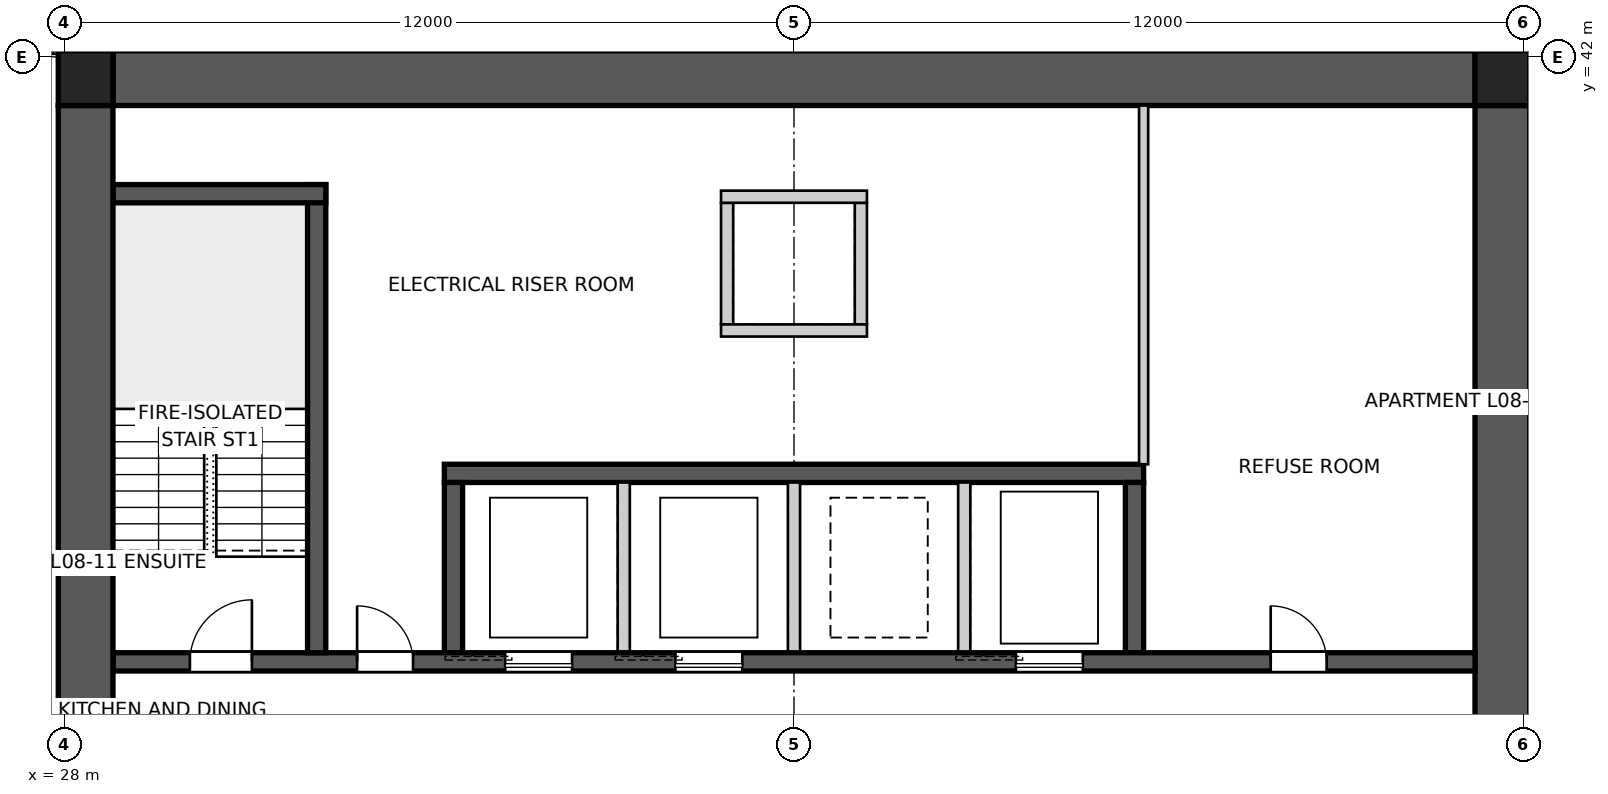
"""IFC4 building model, lengths in metres.
Left out: names, types, materials, properties, quantities, classifications, styles, units other than length and angle.
Written with IfcOpenShell. Run it as: python <this file> out.ifc"""

import sys

from ifc_helpers import new_model, si_unit, direction, frame, frame_2d, origin, origin_2d, place, context, subcontext, project, spatial, polyline, rectangle, outline, extrude, element, fill, save


model = new_model("IFC4")
c1 = context("Model", 3, precision=1e-05, world=origin(), true_north=direction((0.0, 1.0)))
c2 = subcontext(c1, "Body", "Model", "MODEL_VIEW")
j1 = project(units=[si_unit("LENGTHUNIT", "METRE"), si_unit("PLANEANGLEUNIT", "RADIAN")], contexts=[c1])
p1 = place(None, origin())
s1 = spatial("IfcSite", under=j1, at=p1, CompositionType="ELEMENT")
p2 = place(p1, origin())
s2 = spatial("IfcBuilding", under=s1, at=p2, CompositionType="ELEMENT")
p3 = place(p2, frame((0.0, 0.0, 32.0)))
s3 = spatial("IfcBuildingStorey", under=s2, at=p3, CompositionType="ELEMENT", Elevation=32.0)
p4 = place(p3, frame((28.8, 41.65, 0.0), z_axis=(0.0, 0.0, 1.0), x_axis=(1.0, 0.0, 0.0)))
e1 = element("IfcWall", 1, at=p4, inside=s3, PredefinedType="SHEAR", context=c2, shape_type="SweptSolid", body=[
    extrude(outline(polyline([(0.0, -0.45), (22.4, -0.45), (22.4, -0.025), (22.85, -0.025), (22.85, 0.025), (22.4, 0.025), (22.4, 0.45), (0.0, 0.45), (0.0, 0.025), (-0.45, 0.025), (-0.45, -0.025), (0.0, -0.025), (0.0, -0.45)])), origin(), (0.0, 0.0, 1.0), 3.4),
])
p5 = place(p3, frame((51.65, 18.8, 0.0), z_axis=(0.0, 0.0, 1.0), x_axis=(0.0, 1.0, 0.0)))
e2 = element("IfcWall", 2, at=p5, inside=s3, PredefinedType="SHEAR", context=c2, shape_type="SweptSolid", body=[
    extrude(outline(polyline([(0.0, -0.45), (22.4, -0.45), (22.4, -0.025), (22.85, -0.025), (22.85, 0.025), (22.4, 0.025), (22.4, 0.45), (0.0, 0.45), (0.0, 0.025), (-0.45, 0.025), (-0.45, -0.025), (0.0, -0.025), (0.0, -0.45)])), origin(), (0.0, 0.0, 1.0), 3.4),
])
p6 = place(p5, frame((11.14, 0.0, 0.0)))
e3 = element("IfcOpeningElement", 3, at=p6, cuts=e2, PredefinedType="OPENING", context=c2, shape_type="SweptSolid", body=[
    extrude(rectangle(XDim=1.02, YDim=2.4, at=frame_2d((0.51, 1.2))), frame((0.0, 0.46, 0.0), z_axis=(0.0, -1.0, 0.0), x_axis=(1.0, 0.0, 0.0)), (0.0, 0.0, 1.0), 0.92),
])
p7 = place(p3, frame((28.35, 41.2, 0.0), z_axis=(0.0, 0.0, 1.0), x_axis=(0.0, -1.0, 0.0)))
e4 = element("IfcWall", 4, at=p7, inside=s3, PredefinedType="SHEAR", context=c2, shape_type="SweptSolid", body=[
    extrude(outline(polyline([(0.0, -0.45), (22.4, -0.45), (22.4, -0.025), (22.85, -0.025), (22.85, 0.025), (22.4, 0.025), (22.4, 0.45), (0.0, 0.45), (0.0, 0.025), (-0.45, 0.025), (-0.45, -0.025), (0.0, -0.025), (0.0, -0.45)])), origin(), (0.0, 0.0, 1.0), 3.4),
])
p8 = place(p7, frame((11.14, 0.0, 0.0)))
e5 = element("IfcOpeningElement", 5, at=p8, cuts=e4, PredefinedType="OPENING", context=c2, shape_type="SweptSolid", body=[
    extrude(rectangle(XDim=1.02, YDim=2.4, at=frame_2d((0.51, 1.2))), frame((0.0, 0.46, 0.0), z_axis=(0.0, -1.0, 0.0), x_axis=(1.0, 0.0, 0.0)), (0.0, 0.0, 1.0), 0.92),
])
p9 = place(p3, frame((28.8, 32.05, 0.0), z_axis=(0.0, 0.0, 1.0), x_axis=(1.0, 0.0, 0.0)))
e6 = element("IfcWall", 6, at=p9, inside=s3, PredefinedType="SHEAR", context=c2, shape_type="SweptSolid", body=[
    extrude(rectangle(XDim=22.4, YDim=0.3, at=frame_2d((11.2, 0.0))), origin(), (0.0, 0.0, 1.0), 3.4),
])
p10 = place(p9, frame((19.04, 0.0, 0.0)))
e7 = element("IfcOpeningElement", 7, at=p10, cuts=e6, PredefinedType="OPENING", context=c2, shape_type="SweptSolid", body=[
    extrude(rectangle(XDim=0.92, YDim=2.1, at=frame_2d((0.46, 1.05))), frame((0.0, 0.16, 0.0), z_axis=(0.0, -1.0, 0.0), x_axis=(1.0, 0.0, 0.0)), (0.0, 0.0, 1.0), 0.32),
])
p11 = place(p9, frame((1.265, 0.0, 0.0)))
e8 = element("IfcOpeningElement", 8, at=p11, cuts=e6, PredefinedType="OPENING", context=c2, shape_type="SweptSolid", body=[
    extrude(rectangle(XDim=1.02, YDim=2.1, at=frame_2d((0.51, 1.05))), frame((0.0, 0.16, 0.0), z_axis=(0.0, -1.0, 0.0), x_axis=(1.0, 0.0, 0.0)), (0.0, 0.0, 1.0), 0.32),
])
p12 = place(p9, frame((4.015, 0.0, 0.0)))
e9 = element("IfcOpeningElement", 9, at=p12, cuts=e6, PredefinedType="OPENING", context=c2, shape_type="SweptSolid", body=[
    extrude(rectangle(XDim=0.92, YDim=2.1, at=frame_2d((0.46, 1.05))), frame((0.0, 0.16, 0.0), z_axis=(0.0, -1.0, 0.0), x_axis=(1.0, 0.0, 0.0)), (0.0, 0.0, 1.0), 0.32),
])
p13 = place(p9, frame((6.45, 0.0, 0.0)))
e10 = element("IfcOpeningElement", 10, at=p13, cuts=e6, PredefinedType="OPENING", context=c2, shape_type="SweptSolid", body=[
    extrude(rectangle(XDim=1.1, YDim=2.1, at=frame_2d((0.55, 1.05))), frame((0.0, 0.16, 0.0), z_axis=(0.0, -1.0, 0.0), x_axis=(1.0, 0.0, 0.0)), (0.0, 0.0, 1.0), 0.32),
])
p14 = place(p9, frame((9.25, 0.0, 0.0)))
e11 = element("IfcOpeningElement", 11, at=p14, cuts=e6, PredefinedType="OPENING", context=c2, shape_type="SweptSolid", body=[
    extrude(rectangle(XDim=1.1, YDim=2.1, at=frame_2d((0.55, 1.05))), frame((0.0, 0.16, 0.0), z_axis=(0.0, -1.0, 0.0), x_axis=(1.0, 0.0, 0.0)), (0.0, 0.0, 1.0), 0.32),
])
p15 = place(p9, frame((14.85, 0.0, 0.0)))
e12 = element("IfcOpeningElement", 12, at=p15, cuts=e6, PredefinedType="OPENING", context=c2, shape_type="SweptSolid", body=[
    extrude(rectangle(XDim=1.1, YDim=2.1, at=frame_2d((0.55, 1.05))), frame((0.0, 0.16, 0.0), z_axis=(0.0, -1.0, 0.0), x_axis=(1.0, 0.0, 0.0)), (0.0, 0.0, 1.0), 0.32),
])
p16 = place(p3, frame((34.25, 35.15, 0.0), z_axis=(0.0, 0.0, 1.0), x_axis=(1.0, 0.0, 0.0)))
e13 = element("IfcWall", 13, at=p16, inside=s3, PredefinedType="SHEAR", context=c2, shape_type="SweptSolid", body=[
    extrude(rectangle(XDim=11.5, YDim=0.3, at=frame_2d((5.75, 0.0))), origin(), (0.0, 0.0, 1.0), 3.4),
])
p17 = place(p3, frame((34.4, 32.2, 0.0), z_axis=(0.0, 0.0, 1.0), x_axis=(0.0, 1.0, 0.0)))
e14 = element("IfcWall", 14, at=p17, inside=s3, PredefinedType="SHEAR", context=c2, shape_type="SweptSolid", body=[
    extrude(rectangle(XDim=2.8, YDim=0.3, at=frame_2d((1.4, 0.0))), origin(), (0.0, 0.0, 1.0), 3.4),
])
for number, where, z_axis, x_axis in (
    (15, (37.2, 32.2, 0.0), (0.0, 0.0, 1.0), (0.0, 1.0, 0.0)),
    (16, (40.0, 32.2, 0.0), (0.0, 0.0, 1.0), (0.0, 1.0, 0.0)),
    (17, (42.8, 32.2, 0.0), (0.0, 0.0, 1.0), (0.0, 1.0, 0.0)),
):
    element("IfcWall", number, at=place(p3, frame(where, z_axis=z_axis, x_axis=x_axis)), inside=s3, PredefinedType="SOLIDWALL", context=c2, shape_type="SweptSolid", body=[
        extrude(rectangle(XDim=2.8, YDim=0.2, at=frame_2d((1.4, 0.0))), origin(), (0.0, 0.0, 1.0), 3.4),
    ])
p18 = place(p3, frame((45.6, 32.2, 0.0), z_axis=(0.0, 0.0, 1.0), x_axis=(0.0, 1.0, 0.0)))
e18 = element("IfcWall", 18, at=p18, inside=s3, PredefinedType="SHEAR", context=c2, shape_type="SweptSolid", body=[
    extrude(rectangle(XDim=2.8, YDim=0.3, at=frame_2d((1.4, 0.0))), origin(), (0.0, 0.0, 1.0), 3.4),
])
p19 = place(p3, frame((32.15, 32.2, 0.0), z_axis=(0.0, 0.0, 1.0), x_axis=(0.0, 1.0, 0.0)))
e19 = element("IfcWall", 19, at=p19, inside=s3, PredefinedType="SHEAR", context=c2, shape_type="SweptSolid", body=[
    extrude(rectangle(XDim=7.7, YDim=0.3, at=frame_2d((3.85, 0.0))), origin(), (0.0, 0.0, 1.0), 3.4),
])
p20 = place(p3, frame((28.8, 39.75, 0.0), z_axis=(0.0, 0.0, 1.0), x_axis=(1.0, 0.0, 0.0)))
e20 = element("IfcWall", 20, at=p20, inside=s3, PredefinedType="SHEAR", context=c2, shape_type="SweptSolid", body=[
    extrude(rectangle(XDim=3.5, YDim=0.3, at=frame_2d((1.75, 0.0))), origin(), (0.0, 0.0, 1.0), 3.4),
])
for number, where, z_axis, x_axis in (
    (21, (38.9, 37.6, 0.0), (0.0, 0.0, 1.0), (0.0, 1.0, 0.0)),
    (22, (41.1, 37.6, 0.0), (0.0, 0.0, 1.0), (0.0, 1.0, 0.0)),
):
    element("IfcWall", number, at=place(p3, frame(where, z_axis=z_axis, x_axis=x_axis)), inside=s3, PredefinedType="SOLIDWALL", context=c2, shape_type="SweptSolid", body=[
        extrude(rectangle(XDim=2.0, YDim=0.2, at=frame_2d((1.0, 0.0))), origin(), (0.0, 0.0, 1.0), 3.4),
    ])
for number, where, z_axis, x_axis in (
    (23, (38.8, 37.5, 0.0), (0.0, 0.0, 1.0), (1.0, 0.0, 0.0)),
    (24, (38.8, 39.7, 0.0), (0.0, 0.0, 1.0), (1.0, 0.0, 0.0)),
):
    element("IfcWall", number, at=place(p3, frame(where, z_axis=z_axis, x_axis=x_axis)), inside=s3, PredefinedType="SOLIDWALL", context=c2, shape_type="SweptSolid", body=[
        extrude(rectangle(XDim=2.4, YDim=0.2, at=frame_2d((1.2, 0.0))), origin(), (0.0, 0.0, 1.0), 3.4),
    ])
for number, where, z_axis, x_axis in (
    (25, (51.65, 41.65, 0.0), (0.0, 0.0, 1.0), (1.0, 0.0, 0.0)),
    (26, (28.35, 41.65, 0.0), (0.0, 0.0, 1.0), (1.0, 0.0, 0.0)),
):
    element("IfcColumn", number, at=place(p3, frame(where, z_axis=z_axis, x_axis=x_axis)), inside=s3, PredefinedType="COLUMN", context=c2, shape_type="SweptSolid", body=[
        extrude(rectangle(XDim=0.9, YDim=0.9, at=origin_2d()), origin(), (0.0, 0.0, 1.0), 3.4),
    ])
p21 = place(p3, frame((45.75, 41.2, 0.0), z_axis=(0.0, 0.0, 1.0), x_axis=(0.0, -1.0, 0.0)))
e27 = element("IfcWall", 27, at=p21, inside=s3, PredefinedType="SOLIDWALL", context=c2, shape_type="SweptSolid", body=[
    extrude(rectangle(XDim=5.9, YDim=0.15, at=frame_2d((2.95, 0.0))), origin(), (0.0, 0.0, 1.0), 3.25),
])
p22 = place(p3, frame((27.9, 44.15, 0.0), z_axis=(0.0, 0.0, 1.0), x_axis=(0.0, -1.0, 0.0)))
e28 = element("IfcWall", 28, at=p22, inside=s3, PredefinedType="PARTITIONING", context=c2, shape_type="SweptSolid", body=[
    extrude(rectangle(XDim=2.1, YDim=0.2, at=frame_2d((1.05, 0.0))), origin(), (0.0, 0.0, 1.0), 3.25),
])
p23 = place(p3, frame((52.1, 41.18, 0.0), z_axis=(0.0, 0.0, 1.0), x_axis=(0.0, 1.0, 0.0)))
e29 = element("IfcWall", 29, at=p23, inside=s3, PredefinedType="PARTITIONING", context=c2, shape_type="SweptSolid", body=[
    extrude(rectangle(XDim=2.97, YDim=0.2, at=frame_2d((1.485, 0.0))), origin(), (0.0, 0.0, 1.0), 3.25),
])
p24 = place(p10, origin())
e30 = element("IfcDoor", 30, at=p24, inside=s3, OperationType="SINGLE_SWING_LEFT", PredefinedType="DOOR", context=c2, shape_type="SweptSolid", body=[
    extrude(rectangle(XDim=0.92, YDim=2.1, at=frame_2d((0.46, 1.05))), frame((0.0, 0.025, 0.0), z_axis=(0.0, -1.0, 0.0), x_axis=(1.0, 0.0, 0.0)), (0.0, 0.0, 1.0), 0.05),
])
fill(e7, e30)
p25 = place(p11, origin())
e31 = element("IfcDoor", 31, at=p25, inside=s3, OperationType="SINGLE_SWING_RIGHT", PredefinedType="DOOR", context=c2, shape_type="SweptSolid", body=[
    extrude(rectangle(XDim=1.02, YDim=2.1, at=frame_2d((0.51, 1.05))), frame((0.0, 0.025, 0.0), z_axis=(0.0, -1.0, 0.0), x_axis=(1.0, 0.0, 0.0)), (0.0, 0.0, 1.0), 0.05),
])
fill(e8, e31)
p26 = place(p12, origin())
e32 = element("IfcDoor", 32, at=p26, inside=s3, OperationType="SINGLE_SWING_LEFT", PredefinedType="DOOR", context=c2, shape_type="SweptSolid", body=[
    extrude(rectangle(XDim=0.92, YDim=2.1, at=frame_2d((0.46, 1.05))), frame((0.0, 0.025, 0.0), z_axis=(0.0, -1.0, 0.0), x_axis=(1.0, 0.0, 0.0)), (0.0, 0.0, 1.0), 0.05),
])
fill(e9, e32)
p27 = place(p13, origin())
e33 = element("IfcDoor", 33, at=p27, inside=s3, OperationType="SLIDING_TO_LEFT", PredefinedType="DOOR", context=c2, shape_type="SweptSolid", body=[
    extrude(rectangle(XDim=1.1, YDim=2.1, at=frame_2d((0.55, 1.05))), frame((0.0, 0.025, 0.0), z_axis=(0.0, -1.0, 0.0), x_axis=(1.0, 0.0, 0.0)), (0.0, 0.0, 1.0), 0.05),
])
fill(e10, e33)
p28 = place(p14, origin())
e34 = element("IfcDoor", 34, at=p28, inside=s3, OperationType="SLIDING_TO_LEFT", PredefinedType="DOOR", context=c2, shape_type="SweptSolid", body=[
    extrude(rectangle(XDim=1.1, YDim=2.1, at=frame_2d((0.55, 1.05))), frame((0.0, 0.025, 0.0), z_axis=(0.0, -1.0, 0.0), x_axis=(1.0, 0.0, 0.0)), (0.0, 0.0, 1.0), 0.05),
])
fill(e11, e34)
p29 = place(p15, origin())
e35 = element("IfcDoor", 35, at=p29, inside=s3, OperationType="SLIDING_TO_LEFT", PredefinedType="DOOR", context=c2, shape_type="SweptSolid", body=[
    extrude(rectangle(XDim=1.1, YDim=2.1, at=frame_2d((0.55, 1.05))), frame((0.0, 0.025, 0.0), z_axis=(0.0, -1.0, 0.0), x_axis=(1.0, 0.0, 0.0)), (0.0, 0.0, 1.0), 0.05),
])
fill(e12, e35)
save(model, sys.argv[1])
